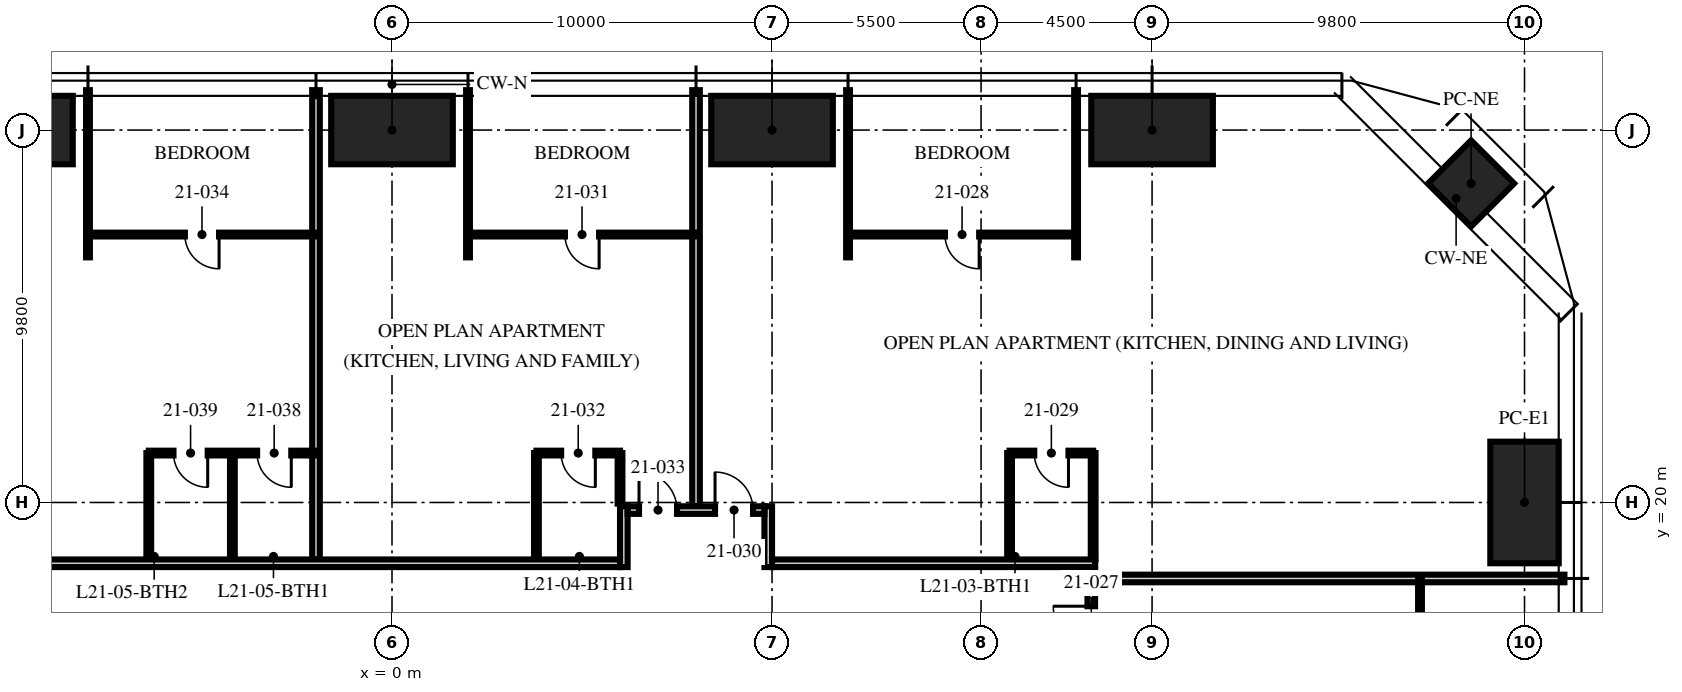
"""IFC4 building model, lengths in metres.
Left out: names, types, materials, properties, quantities, classifications, styles, units other than length and angle.
Written with IfcOpenShell. Run it as: python <this file> out.ifc"""

import sys

from ifc_helpers import new_model, si_unit, direction, frame, frame_2d, origin, origin_2d, place, context, subcontext, project, spatial, rectangle, hollow_rectangle, extrude, element, fill, save


model = new_model("IFC4")
c1 = context("Model", 3, precision=1e-05, world=origin(), true_north=direction((0.0, 1.0)))
c2 = subcontext(c1, "Body", "Model", "MODEL_VIEW")
j1 = project(units=[si_unit("LENGTHUNIT", "METRE"), si_unit("PLANEANGLEUNIT", "RADIAN")], contexts=[c1])
p1 = place(None, origin())
s1 = spatial("IfcSite", under=j1, at=p1, CompositionType="ELEMENT")
p2 = place(p1, origin())
s2 = spatial("IfcBuilding", under=s1, at=p2, CompositionType="ELEMENT")
p3 = place(p2, frame((0.0, 0.0, 84.75)))
s3 = spatial("IfcBuildingStorey", under=s2, at=p3, CompositionType="ELEMENT", Elevation=84.75)
for number, where, z_axis, x_axis in (
    (1, (-10.0, 29.8, 0.0), (0.0, 0.0, 1.0), (1.0, 0.0, 0.0)),
    (2, (0.0, 29.8, 0.0), (0.0, 0.0, 1.0), (1.0, 0.0, 0.0)),
    (3, (10.0, 29.8, 0.0), (0.0, 0.0, 1.0), (1.0, 0.0, 0.0)),
    (4, (20.0, 29.8, 0.0), (0.0, 0.0, 1.0), (1.0, 0.0, 0.0)),
    (5, (29.8, 20.0, 0.0), (0.0, 0.0, 1.0), (0.0, 1.0, 0.0)),
):
    element("IfcColumn", number, at=place(p3, frame(where, z_axis=z_axis, x_axis=x_axis)), inside=s3, PredefinedType="COLUMN", context=c2, shape_type="SweptSolid", body=[
        extrude(hollow_rectangle(XDim=3.2, YDim=1.8, WallThickness=0.2, at=origin_2d()), origin(), (0.0, 0.0, 1.0), 3.75),
    ])
p4 = place(p3, frame((28.394, 28.394, 0.0), z_axis=(0.0, 0.0, 1.0), x_axis=(0.707106781187, -0.707106781187, 0.0)))
e6 = element("IfcColumn", 6, at=p4, inside=s3, PredefinedType="COLUMN", context=c2, shape_type="SweptSolid", body=[
    extrude(hollow_rectangle(XDim=1.6, YDim=1.6, WallThickness=0.1, at=origin_2d()), origin(), (0.0, 0.0, 1.0), 3.75),
])
p5 = place(p3, frame((18.5, 18.0, 0.0), z_axis=(0.0, 0.0, 1.0), x_axis=(1.0, 0.0, 0.0)))
e7 = element("IfcWall", 7, at=p5, inside=s3, PredefinedType="PARTITIONING", context=c2, shape_type="SweptSolid", body=[
    extrude(rectangle(XDim=12.35, YDim=0.2, at=frame_2d((6.175, 0.0))), origin(), (0.0, 0.0, 1.0), 2.3),
])
for number, where, z_axis, x_axis in (
    (8, (18.0, 26.45, 0.0), (0.0, 0.0, 1.0), (0.0, 1.0, 0.0)),
    (9, (12.0, 26.45, 0.0), (0.0, 0.0, 1.0), (0.0, 1.0, 0.0)),
):
    element("IfcWall", number, at=place(p3, frame(where, z_axis=z_axis, x_axis=x_axis)), inside=s3, PredefinedType="PARTITIONING", context=c2, shape_type="SweptSolid", body=[
        extrude(rectangle(XDim=4.4, YDim=0.1, at=frame_2d((2.2, 0.0))), origin(), (0.0, 0.0, 1.0), 2.71),
    ])
p6 = place(p3, frame((8.0, 19.9, 0.0), z_axis=(0.0, 0.0, 1.0), x_axis=(0.0, 1.0, 0.0)))
e10 = element("IfcWall", 10, at=p6, inside=s3, PredefinedType="PARTITIONING", context=c2, shape_type="SweptSolid", body=[
    extrude(rectangle(XDim=10.95, YDim=0.2, at=frame_2d((5.475, 0.0))), origin(), (0.0, 0.0, 1.0), 2.71),
])
p7 = place(p3, frame((2.0, 26.45, 0.0), z_axis=(0.0, 0.0, 1.0), x_axis=(0.0, 1.0, 0.0)))
e11 = element("IfcWall", 11, at=p7, inside=s3, PredefinedType="PARTITIONING", context=c2, shape_type="SweptSolid", body=[
    extrude(rectangle(XDim=4.4, YDim=0.1, at=frame_2d((2.2, 0.0))), origin(), (0.0, 0.0, 1.0), 2.71),
])
p8 = place(p3, frame((-2.0, 18.5, 0.0), z_axis=(0.0, 0.0, 1.0), x_axis=(0.0, 1.0, 0.0)))
e12 = element("IfcWall", 12, at=p8, inside=s3, PredefinedType="PARTITIONING", context=c2, shape_type="SweptSolid", body=[
    extrude(rectangle(XDim=12.35, YDim=0.2, at=frame_2d((6.175, 0.0))), origin(), (0.0, 0.0, 1.0), 2.71),
])
p9 = place(p3, frame((-8.0, 26.45, 0.0), z_axis=(0.0, 0.0, 1.0), x_axis=(0.0, 1.0, 0.0)))
e13 = element("IfcWall", 13, at=p9, inside=s3, PredefinedType="PARTITIONING", context=c2, shape_type="SweptSolid", body=[
    extrude(rectangle(XDim=4.4, YDim=0.1, at=frame_2d((2.2, 0.0))), origin(), (0.0, 0.0, 1.0), 2.71),
])
p10 = place(p3, frame((27.05, 12.0, 0.0), z_axis=(0.0, 0.0, 1.0), x_axis=(0.0, 1.0, 0.0)))
e14 = element("IfcWall", 14, at=p10, inside=s3, PredefinedType="PARTITIONING", context=c2, shape_type="SweptSolid", body=[
    extrude(rectangle(XDim=6.0, YDim=0.1, at=frame_2d((3.0, 0.0))), origin(), (0.0, 0.0, 1.0), 2.61),
])
p11 = place(p10, frame((2.55, 0.0, 0.0)))
e15 = element("IfcOpeningElement", 15, at=p11, cuts=e14, PredefinedType="OPENING", context=c2, shape_type="SweptSolid", body=[
    extrude(rectangle(XDim=0.9, YDim=2.1, at=frame_2d((0.45, 1.05))), frame((0.0, 0.06, 0.0), z_axis=(0.0, -1.0, 0.0), x_axis=(1.0, 0.0, 0.0)), (0.0, 0.0, 1.0), 0.12),
])
p12 = place(p3, frame((18.0, 27.05, 0.0), z_axis=(0.0, 0.0, 1.0), x_axis=(-1.0, 0.0, 0.0)))
e16 = element("IfcWall", 16, at=p12, inside=s3, PredefinedType="PARTITIONING", context=c2, shape_type="SweptSolid", body=[
    extrude(rectangle(XDim=6.0, YDim=0.1, at=frame_2d((3.0, 0.0))), origin(), (0.0, 0.0, 1.0), 2.61),
])
p13 = place(p12, frame((2.55, 0.0, 0.0)))
e17 = element("IfcOpeningElement", 17, at=p13, cuts=e16, PredefinedType="OPENING", context=c2, shape_type="SweptSolid", body=[
    extrude(rectangle(XDim=0.9, YDim=2.1, at=frame_2d((0.45, 1.05))), frame((0.0, 0.06, 0.0), z_axis=(0.0, -1.0, 0.0), x_axis=(1.0, 0.0, 0.0)), (0.0, 0.0, 1.0), 0.12),
])
p14 = place(p3, frame((18.45, 21.3, 0.0), z_axis=(0.0, 0.0, 1.0), x_axis=(-1.0, 0.0, 0.0)))
e18 = element("IfcWall", 18, at=p14, inside=s3, PredefinedType="PARTITIONING", context=c2, shape_type="SweptSolid", body=[
    extrude(rectangle(XDim=2.2, YDim=0.125, at=frame_2d((1.1, 0.0))), origin(), (0.0, 0.0, 1.0), 3.5),
])
p15 = place(p14, frame((0.65, 0.0, 0.0)))
e19 = element("IfcOpeningElement", 19, at=p15, cuts=e18, PredefinedType="OPENING", context=c2, shape_type="SweptSolid", body=[
    extrude(rectangle(XDim=0.9, YDim=2.1, at=frame_2d((0.45, 1.05))), frame((0.0, 0.073, 0.0), z_axis=(0.0, -1.0, 0.0), x_axis=(1.0, 0.0, 0.0)), (0.0, 0.0, 1.0), 0.145),
])
p16 = place(p3, frame((18.45, 18.5, 0.0), z_axis=(0.0, 0.0, 1.0), x_axis=(0.0, 1.0, 0.0)))
e20 = element("IfcWall", 20, at=p16, inside=s3, PredefinedType="PARTITIONING", context=c2, shape_type="SweptSolid", body=[
    extrude(rectangle(XDim=2.8, YDim=0.125, at=frame_2d((1.4, 0.0))), origin(), (0.0, 0.0, 1.0), 2.3),
])
p17 = place(p3, frame((16.25, 18.5, 0.0), z_axis=(0.0, 0.0, 1.0), x_axis=(0.0, 1.0, 0.0)))
e21 = element("IfcWall", 21, at=p17, inside=s3, PredefinedType="PARTITIONING", context=c2, shape_type="SweptSolid", body=[
    extrude(rectangle(XDim=2.8, YDim=0.125, at=frame_2d((1.4, 0.0))), origin(), (0.0, 0.0, 1.0), 3.5),
])
p18 = place(p3, frame((8.0, 27.05, 0.0), z_axis=(0.0, 0.0, 1.0), x_axis=(-1.0, 0.0, 0.0)))
e22 = element("IfcWall", 22, at=p18, inside=s3, PredefinedType="PARTITIONING", context=c2, shape_type="SweptSolid", body=[
    extrude(rectangle(XDim=6.0, YDim=0.1, at=frame_2d((3.0, 0.0))), origin(), (0.0, 0.0, 1.0), 2.61),
])
p19 = place(p18, frame((2.55, 0.0, 0.0)))
e23 = element("IfcOpeningElement", 23, at=p19, cuts=e22, PredefinedType="OPENING", context=c2, shape_type="SweptSolid", body=[
    extrude(rectangle(XDim=0.9, YDim=2.1, at=frame_2d((0.45, 1.05))), frame((0.0, 0.06, 0.0), z_axis=(0.0, -1.0, 0.0), x_axis=(1.0, 0.0, 0.0)), (0.0, 0.0, 1.0), 0.12),
])
p20 = place(p3, frame((6.0, 21.3, 0.0), z_axis=(0.0, 0.0, 1.0), x_axis=(-1.0, 0.0, 0.0)))
e24 = element("IfcWall", 24, at=p20, inside=s3, PredefinedType="PARTITIONING", context=c2, shape_type="SweptSolid", body=[
    extrude(rectangle(XDim=2.2, YDim=0.125, at=frame_2d((1.1, 0.0))), origin(), (0.0, 0.0, 1.0), 2.61),
])
p21 = place(p20, frame((0.65, 0.0, 0.0)))
e25 = element("IfcOpeningElement", 25, at=p21, cuts=e24, PredefinedType="OPENING", context=c2, shape_type="SweptSolid", body=[
    extrude(rectangle(XDim=0.9, YDim=2.1, at=frame_2d((0.45, 1.05))), frame((0.0, 0.073, 0.0), z_axis=(0.0, -1.0, 0.0), x_axis=(1.0, 0.0, 0.0)), (0.0, 0.0, 1.0), 0.145),
])
p22 = place(p3, frame((6.0, 19.97, 0.0), z_axis=(0.0, 0.0, 1.0), x_axis=(0.0, 1.0, 0.0)))
e26 = element("IfcWall", 26, at=p22, inside=s3, PredefinedType="PARTITIONING", context=c2, shape_type="SweptSolid", body=[
    extrude(rectangle(XDim=1.33, YDim=0.125, at=frame_2d((0.665, 0.0))), origin(), (0.0, 0.0, 1.0), 3.5),
])
p23 = place(p3, frame((3.8, 18.5, 0.0), z_axis=(0.0, 0.0, 1.0), x_axis=(0.0, 1.0, 0.0)))
e27 = element("IfcWall", 27, at=p23, inside=s3, PredefinedType="PARTITIONING", context=c2, shape_type="SweptSolid", body=[
    extrude(rectangle(XDim=2.8, YDim=0.125, at=frame_2d((1.4, 0.0))), origin(), (0.0, 0.0, 1.0), 3.5),
])
p24 = place(p3, frame((-2.0, 27.05, 0.0), z_axis=(0.0, 0.0, 1.0), x_axis=(-1.0, 0.0, 0.0)))
e28 = element("IfcWall", 28, at=p24, inside=s3, PredefinedType="PARTITIONING", context=c2, shape_type="SweptSolid", body=[
    extrude(rectangle(XDim=6.0, YDim=0.1, at=frame_2d((3.0, 0.0))), origin(), (0.0, 0.0, 1.0), 2.61),
])
p25 = place(p24, frame((2.55, 0.0, 0.0)))
e29 = element("IfcOpeningElement", 29, at=p25, cuts=e28, PredefinedType="OPENING", context=c2, shape_type="SweptSolid", body=[
    extrude(rectangle(XDim=0.9, YDim=2.1, at=frame_2d((0.45, 1.05))), frame((0.0, 0.06, 0.0), z_axis=(0.0, -1.0, 0.0), x_axis=(1.0, 0.0, 0.0)), (0.0, 0.0, 1.0), 0.12),
])
p26 = place(p3, frame((-2.0, 21.3, 0.0), z_axis=(0.0, 0.0, 1.0), x_axis=(-1.0, 0.0, 0.0)))
e30 = element("IfcWall", 30, at=p26, inside=s3, PredefinedType="PARTITIONING", context=c2, shape_type="SweptSolid", body=[
    extrude(rectangle(XDim=4.4, YDim=0.125, at=frame_2d((2.2, 0.0))), origin(), (0.0, 0.0, 1.0), 2.61),
])
p27 = place(p26, frame((0.65, 0.0, 0.0)))
e31 = element("IfcOpeningElement", 31, at=p27, cuts=e30, PredefinedType="OPENING", context=c2, shape_type="SweptSolid", body=[
    extrude(rectangle(XDim=0.9, YDim=2.1, at=frame_2d((0.45, 1.05))), frame((0.0, 0.073, 0.0), z_axis=(0.0, -1.0, 0.0), x_axis=(1.0, 0.0, 0.0)), (0.0, 0.0, 1.0), 0.145),
])
p28 = place(p26, frame((2.85, 0.0, 0.0)))
e32 = element("IfcOpeningElement", 32, at=p28, cuts=e30, PredefinedType="OPENING", context=c2, shape_type="SweptSolid", body=[
    extrude(rectangle(XDim=0.9, YDim=2.1, at=frame_2d((0.45, 1.05))), frame((0.0, 0.073, 0.0), z_axis=(0.0, -1.0, 0.0), x_axis=(1.0, 0.0, 0.0)), (0.0, 0.0, 1.0), 0.145),
])
for number, where, z_axis, x_axis in (
    (33, (-4.2, 18.5, 0.0), (0.0, 0.0, 1.0), (0.0, 1.0, 0.0)),
    (34, (-6.4, 18.5, 0.0), (0.0, 0.0, 1.0), (0.0, 1.0, 0.0)),
):
    element("IfcWall", number, at=place(p3, frame(where, z_axis=z_axis, x_axis=x_axis)), inside=s3, PredefinedType="PARTITIONING", context=c2, shape_type="SweptSolid", body=[
        extrude(rectangle(XDim=2.8, YDim=0.125, at=frame_2d((1.4, 0.0))), origin(), (0.0, 0.0, 1.0), 3.5),
    ])
p29 = place(p3, frame((18.4, -6.0, 0.0), z_axis=(0.0, 0.0, 1.0), x_axis=(0.0, 1.0, 0.0)))
e35 = element("IfcWall", 35, at=p29, inside=s3, PredefinedType="PARTITIONING", context=c2, shape_type="SweptSolid", body=[
    extrude(rectangle(XDim=24.3, YDim=0.2, at=frame_2d((12.15, 0.0))), origin(), (0.0, 0.0, 1.0), 2.3),
])
p30 = place(p29, frame((22.27, 0.0, 0.0)))
e36 = element("IfcOpeningElement", 36, at=p30, cuts=e35, PredefinedType="OPENING", context=c2, shape_type="SweptSolid", body=[
    extrude(rectangle(XDim=1.0, YDim=2.2, at=frame_2d((0.5, 1.1))), frame((0.0, 0.11, 0.0), z_axis=(0.0, -1.0, 0.0), x_axis=(1.0, 0.0, 0.0)), (0.0, 0.0, 1.0), 0.22),
])
p31 = place(p3, frame((-18.5, 18.4, 0.0), z_axis=(0.0, 0.0, 1.0), x_axis=(1.0, 0.0, 0.0)))
e37 = element("IfcWall", 37, at=p31, inside=s3, PredefinedType="PARTITIONING", context=c2, shape_type="SweptSolid", body=[
    extrude(rectangle(XDim=24.5, YDim=0.2, at=frame_2d((12.25, 0.0))), origin(), (0.0, 0.0, 1.0), 2.3),
])
p32 = place(p3, frame((6.1, 18.3, 0.0), z_axis=(0.0, 0.0, 1.0), x_axis=(0.0, 1.0, 0.0)))
e38 = element("IfcWall", 38, at=p32, inside=s3, PredefinedType="PARTITIONING", context=c2, shape_type="SweptSolid", body=[
    extrude(rectangle(XDim=1.6, YDim=0.2, at=frame_2d((0.8, 0.0))), origin(), (0.0, 0.0, 1.0), 3.5),
])
p33 = place(p3, frame((9.9, 18.3, 0.0), z_axis=(0.0, 0.0, 1.0), x_axis=(0.0, 1.0, 0.0)))
e39 = element("IfcWall", 39, at=p33, inside=s3, PredefinedType="PARTITIONING", context=c2, shape_type="SweptSolid", body=[
    extrude(rectangle(XDim=1.6, YDim=0.2, at=frame_2d((0.8, 0.0))), origin(), (0.0, 0.0, 1.0), 2.492),
])
p34 = place(p3, frame((6.2, 19.8, 0.0), z_axis=(0.0, 0.0, 1.0), x_axis=(1.0, 0.0, 0.0)))
e40 = element("IfcWall", 40, at=p34, inside=s3, PredefinedType="PARTITIONING", context=c2, shape_type="SweptSolid", body=[
    extrude(rectangle(XDim=3.6, YDim=0.2, at=frame_2d((1.8, 0.0))), origin(), (0.0, 0.0, 1.0), 3.5),
])
p35 = place(p34, frame((2.3, 0.0, 0.0)))
e41 = element("IfcOpeningElement", 41, at=p35, cuts=e40, PredefinedType="OPENING", context=c2, shape_type="SweptSolid", body=[
    extrude(rectangle(XDim=1.0, YDim=2.2, at=frame_2d((0.5, 1.1))), frame((0.0, 0.11, 0.0), z_axis=(0.0, -1.0, 0.0), x_axis=(1.0, 0.0, 0.0)), (0.0, 0.0, 1.0), 0.22),
])
p36 = place(p34, frame((0.3, 0.0, 0.0)))
e42 = element("IfcOpeningElement", 42, at=p36, cuts=e40, PredefinedType="OPENING", context=c2, shape_type="SweptSolid", body=[
    extrude(rectangle(XDim=1.0, YDim=2.2, at=frame_2d((0.5, 1.1))), frame((0.0, 0.11, 0.0), z_axis=(0.0, -1.0, 0.0), x_axis=(1.0, 0.0, 0.0)), (0.0, 0.0, 1.0), 0.22),
])
p37 = place(p3, frame((10.0, 18.4, 0.0), z_axis=(0.0, 0.0, 1.0), x_axis=(1.0, 0.0, 0.0)))
e43 = element("IfcWall", 43, at=p37, inside=s3, PredefinedType="PARTITIONING", context=c2, shape_type="SweptSolid", body=[
    extrude(rectangle(XDim=8.5, YDim=0.2, at=frame_2d((4.25, 0.0))), origin(), (0.0, 0.0, 1.0), 2.3),
])
p38 = place(p30, origin())
e44 = element("IfcDoor", 44, at=p38, inside=s3, OperationType="SINGLE_SWING_RIGHT", PredefinedType="DOOR", context=c2, shape_type="SweptSolid", body=[
    extrude(rectangle(XDim=1.0, YDim=2.2, at=frame_2d((0.5, 1.1))), frame((0.0, 0.025, 0.0), z_axis=(0.0, -1.0, 0.0), x_axis=(1.0, 0.0, 0.0)), (0.0, 0.0, 1.0), 0.05),
])
fill(e36, e44)
p39 = place(p13, origin())
e45 = element("IfcDoor", 45, at=p39, inside=s3, OperationType="SINGLE_SWING_LEFT", PredefinedType="DOOR", context=c2, shape_type="SweptSolid", body=[
    extrude(rectangle(XDim=0.9, YDim=2.1, at=frame_2d((0.45, 1.05))), frame((0.0, 0.025, 0.0), z_axis=(0.0, -1.0, 0.0), x_axis=(1.0, 0.0, 0.0)), (0.0, 0.0, 1.0), 0.05),
])
fill(e17, e45)
p40 = place(p15, origin())
e46 = element("IfcDoor", 46, at=p40, inside=s3, OperationType="SINGLE_SWING_LEFT", PredefinedType="DOOR", context=c2, shape_type="SweptSolid", body=[
    extrude(rectangle(XDim=0.9, YDim=2.1, at=frame_2d((0.45, 1.05))), frame((0.0, 0.025, 0.0), z_axis=(0.0, -1.0, 0.0), x_axis=(1.0, 0.0, 0.0)), (0.0, 0.0, 1.0), 0.05),
])
fill(e19, e46)
p41 = place(p35, origin())
e47 = element("IfcDoor", 47, at=p41, inside=s3, OperationType="SINGLE_SWING_LEFT", PredefinedType="DOOR", context=c2, shape_type="SweptSolid", body=[
    extrude(rectangle(XDim=1.0, YDim=2.2, at=frame_2d((0.5, 1.1))), frame((0.0, 0.025, 0.0), z_axis=(0.0, -1.0, 0.0), x_axis=(1.0, 0.0, 0.0)), (0.0, 0.0, 1.0), 0.05),
])
fill(e41, e47)
p42 = place(p19, origin())
e48 = element("IfcDoor", 48, at=p42, inside=s3, OperationType="SINGLE_SWING_LEFT", PredefinedType="DOOR", context=c2, shape_type="SweptSolid", body=[
    extrude(rectangle(XDim=0.9, YDim=2.1, at=frame_2d((0.45, 1.05))), frame((0.0, 0.025, 0.0), z_axis=(0.0, -1.0, 0.0), x_axis=(1.0, 0.0, 0.0)), (0.0, 0.0, 1.0), 0.05),
])
fill(e23, e48)
p43 = place(p21, origin())
e49 = element("IfcDoor", 49, at=p43, inside=s3, OperationType="SINGLE_SWING_LEFT", PredefinedType="DOOR", context=c2, shape_type="SweptSolid", body=[
    extrude(rectangle(XDim=0.9, YDim=2.1, at=frame_2d((0.45, 1.05))), frame((0.0, 0.025, 0.0), z_axis=(0.0, -1.0, 0.0), x_axis=(1.0, 0.0, 0.0)), (0.0, 0.0, 1.0), 0.05),
])
fill(e25, e49)
p44 = place(p36, origin())
e50 = element("IfcDoor", 50, at=p44, inside=s3, OperationType="SINGLE_SWING_LEFT", PredefinedType="DOOR", context=c2, shape_type="SweptSolid", body=[
    extrude(rectangle(XDim=1.0, YDim=2.2, at=frame_2d((0.5, 1.1))), frame((0.0, 0.025, 0.0), z_axis=(0.0, -1.0, 0.0), x_axis=(1.0, 0.0, 0.0)), (0.0, 0.0, 1.0), 0.05),
])
fill(e42, e50)
p45 = place(p25, origin())
e51 = element("IfcDoor", 51, at=p45, inside=s3, OperationType="SINGLE_SWING_LEFT", PredefinedType="DOOR", context=c2, shape_type="SweptSolid", body=[
    extrude(rectangle(XDim=0.9, YDim=2.1, at=frame_2d((0.45, 1.05))), frame((0.0, 0.025, 0.0), z_axis=(0.0, -1.0, 0.0), x_axis=(1.0, 0.0, 0.0)), (0.0, 0.0, 1.0), 0.05),
])
fill(e29, e51)
p46 = place(p27, origin())
e52 = element("IfcDoor", 52, at=p46, inside=s3, OperationType="SINGLE_SWING_LEFT", PredefinedType="DOOR", context=c2, shape_type="SweptSolid", body=[
    extrude(rectangle(XDim=0.9, YDim=2.1, at=frame_2d((0.45, 1.05))), frame((0.0, 0.025, 0.0), z_axis=(0.0, -1.0, 0.0), x_axis=(1.0, 0.0, 0.0)), (0.0, 0.0, 1.0), 0.05),
])
fill(e31, e52)
p47 = place(p28, origin())
e53 = element("IfcDoor", 53, at=p47, inside=s3, OperationType="SINGLE_SWING_LEFT", PredefinedType="DOOR", context=c2, shape_type="SweptSolid", body=[
    extrude(rectangle(XDim=0.9, YDim=2.1, at=frame_2d((0.45, 1.05))), frame((0.0, 0.025, 0.0), z_axis=(0.0, -1.0, 0.0), x_axis=(1.0, 0.0, 0.0)), (0.0, 0.0, 1.0), 0.05),
])
fill(e32, e53)
save(model, sys.argv[1])
